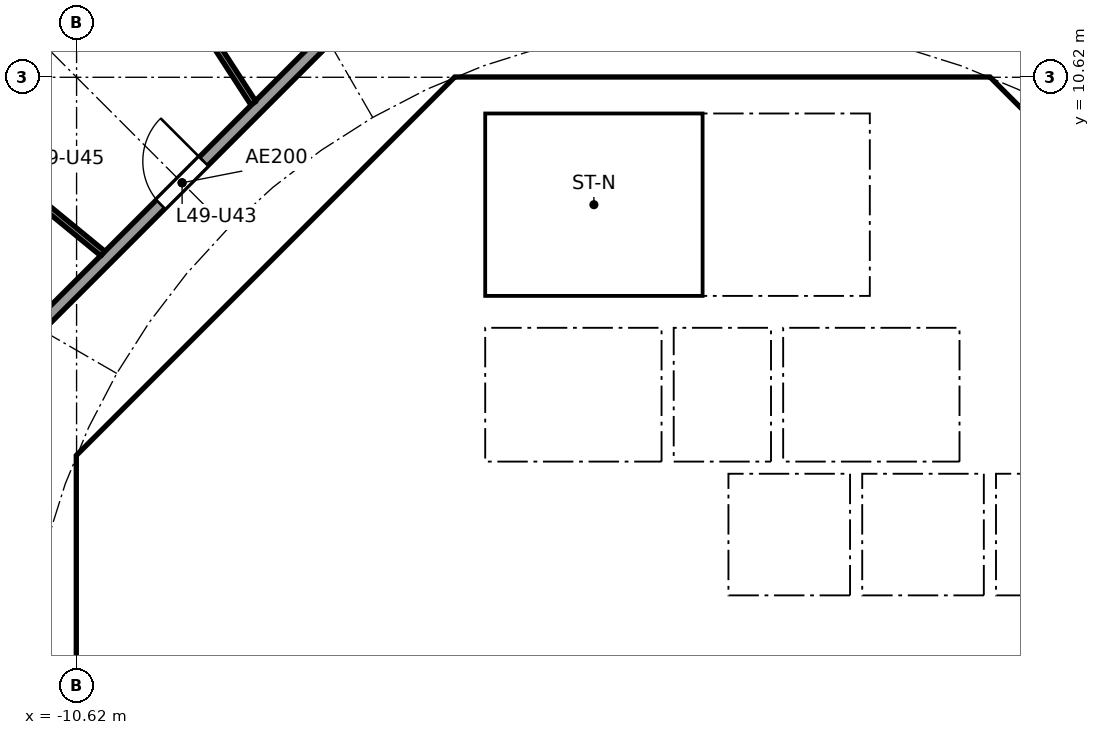
"""IFC4 building model, lengths in metres.
Left out: names, types, materials, properties, quantities, classifications, styles, units other than length and angle.
Written with IfcOpenShell. Run it as: python <this file> out.ifc"""

import sys

from ifc_helpers import new_model, si_unit, direction, frame, frame_2d, origin, place, context, subcontext, project, spatial, polyline, rectangle, outline, extrude, element, fill, save


model = new_model("IFC4")
c1 = context("Model", 3, precision=1e-05, world=origin(), true_north=direction((0.0, 1.0)))
c2 = subcontext(c1, "Body", "Model", "MODEL_VIEW")
j1 = project(units=[si_unit("LENGTHUNIT", "METRE"), si_unit("PLANEANGLEUNIT", "RADIAN")], contexts=[c1])
p1 = place(None, origin())
s1 = spatial("IfcSite", under=j1, at=p1, CompositionType="ELEMENT")
p2 = place(p1, origin())
s2 = spatial("IfcBuilding", under=s1, at=p2, CompositionType="ELEMENT")
p3 = place(p2, frame((0.0, 0.0, 195.5)))
s3 = spatial("IfcBuildingStorey", under=s2, at=p3, CompositionType="ELEMENT", Elevation=195.5)
p4 = place(p3, frame((9.988, 4.613, 0.0), z_axis=(0.0, 0.0, 1.0), x_axis=(-0.707106781187, 0.707106781187, 0.0)))
e1 = element("IfcWall", 1, at=p4, inside=s3, PredefinedType="SHEAR", context=c2, shape_type="SweptSolid", body=[
    extrude(rectangle(XDim=7.602, YDim=0.6, at=frame_2d((3.801, 0.0))), origin(), (0.0, 0.0, 1.0), 3.44),
])
p5 = place(p4, frame((3.201, 0.0, 0.0)))
e2 = element("IfcOpeningElement", 2, at=p5, cuts=e1, PredefinedType="OPENING", context=c2, shape_type="SweptSolid", body=[
    extrude(rectangle(XDim=1.2, YDim=2.1, at=frame_2d((0.6, 1.05))), frame((0.0, 0.31, 0.0), z_axis=(0.0, -1.0, 0.0), x_axis=(1.0, 0.0, 0.0)), (0.0, 0.0, 1.0), 0.62),
])
p6 = place(p3, frame((-4.613, 9.988, 0.0), z_axis=(0.0, 0.0, 1.0), x_axis=(-0.707106781187, -0.707106781187, 0.0)))
e3 = element("IfcWall", 3, at=p6, inside=s3, PredefinedType="SHEAR", context=c2, shape_type="SweptSolid", body=[
    extrude(rectangle(XDim=7.602, YDim=0.6, at=frame_2d((3.801, 0.0))), origin(), (0.0, 0.0, 1.0), 3.44),
])
p7 = place(p6, frame((0.351, 0.0, 0.0)))
e4 = element("IfcOpeningElement", 4, at=p7, cuts=e3, PredefinedType="OPENING", context=c2, shape_type="SweptSolid", body=[
    extrude(rectangle(XDim=1.1, YDim=2.1, at=frame_2d((0.55, 1.05))), frame((0.0, 0.31, 0.0), z_axis=(0.0, -1.0, 0.0), x_axis=(1.0, 0.0, 0.0)), (0.0, 0.0, 1.0), 0.62),
])
p8 = place(p3, frame((-10.325, 3.801, 0.0), z_axis=(0.0, 0.0, 1.0), x_axis=(0.0, -1.0, 0.0)))
e5 = element("IfcWall", 5, at=p8, inside=s3, PredefinedType="SHEAR", context=c2, shape_type="SweptSolid", body=[
    extrude(rectangle(XDim=7.602, YDim=0.6, at=frame_2d((3.801, 0.0))), origin(), (0.0, 0.0, 1.0), 3.44),
])
p9 = place(p8, frame((0.651, 0.0, 0.0)))
e6 = element("IfcOpeningElement", 6, at=p9, cuts=e5, PredefinedType="OPENING", context=c2, shape_type="SweptSolid", body=[
    extrude(rectangle(XDim=1.5, YDim=2.1, at=frame_2d((0.75, 1.05))), frame((0.0, 0.31, 0.0), z_axis=(0.0, -1.0, 0.0), x_axis=(1.0, 0.0, 0.0)), (0.0, 0.0, 1.0), 0.62),
])
p10 = place(p8, frame((5.451, 0.0, 0.0)))
e7 = element("IfcOpeningElement", 7, at=p10, cuts=e5, PredefinedType="OPENING", context=c2, shape_type="SweptSolid", body=[
    extrude(rectangle(XDim=1.5, YDim=2.1, at=frame_2d((0.75, 1.05))), frame((0.0, 0.31, 0.0), z_axis=(0.0, -1.0, 0.0), x_axis=(1.0, 0.0, 0.0)), (0.0, 0.0, 1.0), 0.62),
])
p11 = place(p3, frame((-5.8, 4.3, 0.0), z_axis=(0.0, 0.0, 1.0), x_axis=(0.0, 1.0, 0.0)))
e8 = element("IfcWall", 8, at=p11, inside=s3, PredefinedType="PARTITIONING", context=c2, shape_type="SweptSolid", body=[
    extrude(rectangle(XDim=3.927, YDim=0.15, at=frame_2d((1.963, 0.0))), origin(), (0.0, 0.0, 1.0), 3.44),
])
p12 = place(p11, frame((1.551, 0.0, 0.0)))
e9 = element("IfcOpeningElement", 9, at=p12, cuts=e8, PredefinedType="OPENING", context=c2, shape_type="SweptSolid", body=[
    extrude(rectangle(XDim=0.9, YDim=2.1, at=frame_2d((0.45, 1.05))), frame((0.0, 0.085, 0.0), z_axis=(0.0, -1.0, 0.0), x_axis=(1.0, 0.0, 0.0)), (0.0, 0.0, 1.0), 0.17),
])
p13 = place(p3, frame((4.0, 4.3, 0.0), z_axis=(0.0, 0.0, 1.0), x_axis=(0.0, 1.0, 0.0)))
e10 = element("IfcWall", 10, at=p13, inside=s3, PredefinedType="SOLIDWALL", context=c2, shape_type="SweptSolid", body=[
    extrude(rectangle(XDim=2.2, YDim=0.2, at=frame_2d((1.1, 0.0))), origin(), (0.0, 0.0, 1.0), 3.44),
])
p14 = place(p13, frame((0.55, 0.0, 0.0)))
e11 = element("IfcOpeningElement", 11, at=p14, cuts=e10, PredefinedType="OPENING", context=c2, shape_type="SweptSolid", body=[
    extrude(rectangle(XDim=1.1, YDim=2.1, at=frame_2d((0.55, 1.05))), frame((0.0, 0.11, 0.0), z_axis=(0.0, -1.0, 0.0), x_axis=(1.0, 0.0, 0.0)), (0.0, 0.0, 1.0), 0.22),
])
p15 = place(p3, frame((-4.0, 4.3, 0.0), z_axis=(0.0, 0.0, 1.0), x_axis=(0.0, 1.0, 0.0)))
e12 = element("IfcWall", 12, at=p15, inside=s3, PredefinedType="SOLIDWALL", context=c2, shape_type="SweptSolid", body=[
    extrude(rectangle(XDim=2.2, YDim=0.2, at=frame_2d((1.1, 0.0))), origin(), (0.0, 0.0, 1.0), 3.44),
])
p16 = place(p15, frame((0.55, 0.0, 0.0)))
e13 = element("IfcOpeningElement", 13, at=p16, cuts=e12, PredefinedType="OPENING", context=c2, shape_type="SweptSolid", body=[
    extrude(rectangle(XDim=1.1, YDim=2.1, at=frame_2d((0.55, 1.05))), frame((0.0, 0.11, 0.0), z_axis=(0.0, -1.0, 0.0), x_axis=(1.0, 0.0, 0.0)), (0.0, 0.0, 1.0), 0.22),
])
p17 = place(p3, frame((-6.7, 2.0, 0.0), z_axis=(0.0, 0.0, 1.0), x_axis=(1.0, 0.0, 0.0)))
e14 = element("IfcWall", 14, at=p17, inside=s3, PredefinedType="SOLIDWALL", context=c2, shape_type="SweptSolid", body=[
    extrude(rectangle(XDim=13.4, YDim=0.2, at=frame_2d((6.7, 0.0))), origin(), (0.0, 0.0, 1.0), 3.44),
])
p18 = place(p17, frame((7.25, 0.0, 0.0)))
e15 = element("IfcOpeningElement", 15, at=p18, cuts=e14, PredefinedType="OPENING", context=c2, shape_type="SweptSolid", body=[
    extrude(rectangle(XDim=1.1, YDim=2.1, at=frame_2d((0.55, 1.05))), frame((0.0, 0.11, 0.0), z_axis=(0.0, -1.0, 0.0), x_axis=(1.0, 0.0, 0.0)), (0.0, 0.0, 1.0), 0.22),
])
p19 = place(p17, frame((9.45, 0.0, 0.0)))
e16 = element("IfcOpeningElement", 16, at=p19, cuts=e14, PredefinedType="OPENING", context=c2, shape_type="SweptSolid", body=[
    extrude(rectangle(XDim=1.1, YDim=2.1, at=frame_2d((0.55, 1.05))), frame((0.0, 0.11, 0.0), z_axis=(0.0, -1.0, 0.0), x_axis=(1.0, 0.0, 0.0)), (0.0, 0.0, 1.0), 0.22),
])
p20 = place(p17, frame((2.95, 0.0, 0.0)))
e17 = element("IfcOpeningElement", 17, at=p20, cuts=e14, PredefinedType="OPENING", context=c2, shape_type="SweptSolid", body=[
    extrude(rectangle(XDim=0.9, YDim=2.1, at=frame_2d((0.45, 1.05))), frame((0.0, 0.11, 0.0), z_axis=(0.0, -1.0, 0.0), x_axis=(1.0, 0.0, 0.0)), (0.0, 0.0, 1.0), 0.22),
])
p21 = place(p3, frame((4.0, 7.025, 0.0), z_axis=(0.0, 0.0, 1.0), x_axis=(0.0, 1.0, 0.0)))
e18 = element("IfcWall", 18, at=p21, inside=s3, PredefinedType="SOLIDWALL", context=c2, shape_type="SweptSolid", body=[
    extrude(rectangle(XDim=3.0, YDim=0.2, at=frame_2d((1.5, 0.0))), origin(), (0.0, 0.0, 1.0), 3.44),
])
p22 = place(p21, frame((0.925, 0.0, 0.0)))
e19 = element("IfcOpeningElement", 19, at=p22, cuts=e18, PredefinedType="OPENING", context=c2, shape_type="SweptSolid", body=[
    extrude(rectangle(XDim=1.1, YDim=2.1, at=frame_2d((0.55, 1.05))), frame((0.0, 0.11, 0.0), z_axis=(0.0, -1.0, 0.0), x_axis=(1.0, 0.0, 0.0)), (0.0, 0.0, 1.0), 0.22),
])
p23 = place(p3, origin())
e20 = element("IfcWall", 20, at=p23, inside=s3, PredefinedType="SHEAR", context=c2, shape_type="SweptSolid", body=[
    extrude(outline(polyline([(-10.2, 4.825), (-9.776, 4.401), (-10.025, 4.152), (-10.025, 3.801), (-10.625, 3.801), (-10.625, 4.401), (-10.2, 4.825)])), origin(), (0.0, 0.0, 1.0), 3.44),
])
p24 = place(p3, origin())
e21 = element("IfcWall", 21, at=p24, inside=s3, PredefinedType="SHEAR", context=c2, shape_type="SweptSolid", body=[
    extrude(outline(polyline([(-4.152, 10.025), (-4.401, 9.776), (-4.825, 10.2), (-4.401, 10.625), (4.401, 10.625), (4.825, 10.2), (4.401, 9.776), (4.152, 10.025), (-4.152, 10.025)])), origin(), (0.0, 0.0, 1.0), 3.44),
])
for number, where, z_axis, x_axis in (
    (22, (-0.9, 4.3, 0.0), (0.0, 0.0, 1.0), (0.0, 1.0, 0.0)),
    (23, (0.9, 4.3, 0.0), (0.0, 0.0, 1.0), (0.0, 1.0, 0.0)),
):
    element("IfcWall", number, at=place(p3, frame(where, z_axis=z_axis, x_axis=x_axis)), inside=s3, PredefinedType="SOLIDWALL", context=c2, shape_type="SweptSolid", body=[
        extrude(rectangle(XDim=2.2, YDim=0.2, at=frame_2d((1.1, 0.0))), origin(), (0.0, 0.0, 1.0), 3.44),
    ])
p25 = place(p3, origin())
e24 = element("IfcWall", 24, at=p25, inside=s3, PredefinedType="SOLIDWALL", context=c2, shape_type="SweptSolid", body=[
    extrude(outline(polyline([(-6.7, 4.3), (6.7, 4.3), (6.7, 2.1), (6.5, 2.1), (6.5, 4.1), (4.5, 4.1), (4.5, 2.1), (4.3, 2.1), (4.3, 4.1), (2.3, 4.1), (2.3, 2.1), (2.1, 2.1), (2.1, 4.1), (0.1, 4.1), (0.1, 2.1), (-0.1, 2.1), (-0.1, 4.1), (-6.5, 4.1), (-6.5, 2.1), (-6.7, 2.1), (-6.7, 4.3)])), origin(), (0.0, 0.0, 1.0), 3.44),
])
p26 = place(p3, frame((-10.025, 4.0, 0.0), z_axis=(0.0, 0.0, 1.0), x_axis=(1.0, 0.0, 0.0)))
e25 = element("IfcWall", 25, at=p26, inside=s3, PredefinedType="PARTITIONING", context=c2, shape_type="SweptSolid", body=[
    extrude(rectangle(XDim=3.325, YDim=0.2, at=frame_2d((1.662, 0.0))), origin(), (0.0, 0.0, 1.0), 3.44),
])
p27 = place(p3, origin())
e26 = element("IfcWall", 26, at=p27, inside=s3, PredefinedType="SOLIDWALL", context=c2, shape_type="SweptSolid", body=[
    extrude(outline(polyline([(-3.9, 7.025), (-4.1, 7.025), (-4.1, 10.025), (-3.9, 10.025), (-3.9, 7.025)])), origin(), (0.0, 0.0, 1.0), 3.44),
])
p28 = place(p3, origin())
e27 = element("IfcWall", 27, at=p28, inside=s3, PredefinedType="SOLIDWALL", context=c2, shape_type="SweptSolid", body=[
    extrude(outline(polyline([(4.1, 6.5), (-4.1, 6.5), (-4.1, 7.025), (4.1, 7.025), (4.1, 6.5)])), origin(), (0.0, 0.0, 1.0), 3.44),
])
p29 = place(p3, frame((-5.275, 12.494, 0.0), z_axis=(0.0, 0.0, 1.0), x_axis=(-0.707106781187, -0.707106781187, 0.0)))
e28 = element("IfcWall", 28, at=p29, inside=s3, PredefinedType="PARTITIONING", context=c2, shape_type="SweptSolid", body=[
    extrude(rectangle(XDim=10.209, YDim=0.2, at=frame_2d((5.104, 0.0))), origin(), (0.0, 0.0, 1.0), 3.44),
])
p30 = place(p29, frame((4.604, 0.0, 0.0)))
e29 = element("IfcOpeningElement", 29, at=p30, cuts=e28, PredefinedType="OPENING", context=c2, shape_type="SweptSolid", body=[
    extrude(rectangle(XDim=1.0, YDim=2.1, at=frame_2d((0.5, 1.05))), frame((0.0, 0.11, 0.0), z_axis=(0.0, -1.0, 0.0), x_axis=(1.0, 0.0, 0.0)), (0.0, 0.0, 1.0), 0.22),
])
p31 = place(p3, frame((-7.712, 10.195, 0.0), z_axis=(0.0, 0.0, 1.0), x_axis=(-0.544179442551, 0.838968851809, 0.0)))
e30 = element("IfcWall", 30, at=p31, inside=s3, PredefinedType="PARTITIONING", context=c2, shape_type="SweptSolid", body=[
    extrude(rectangle(XDim=7.566, YDim=0.1, at=frame_2d((3.783, 0.0))), origin(), (0.0, 0.0, 1.0), 2.756),
])
p32 = place(p31, frame((1.343, 0.0, 0.0)))
e31 = element("IfcOpeningElement", 31, at=p32, cuts=e30, PredefinedType="OPENING", context=c2, shape_type="SweptSolid", body=[
    extrude(rectangle(XDim=0.9, YDim=2.1, at=frame_2d((0.45, 1.05))), frame((0.0, 0.06, 0.0), z_axis=(0.0, -1.0, 0.0), x_axis=(1.0, 0.0, 0.0)), (0.0, 0.0, 1.0), 0.12),
])
p33 = place(p31, frame((5.101, 0.0, 0.0)))
e32 = element("IfcOpeningElement", 32, at=p33, cuts=e30, PredefinedType="OPENING", context=c2, shape_type="SweptSolid", body=[
    extrude(rectangle(XDim=0.9, YDim=2.1, at=frame_2d((0.45, 1.05))), frame((0.0, 0.06, 0.0), z_axis=(0.0, -1.0, 0.0), x_axis=(1.0, 0.0, 0.0)), (0.0, 0.0, 1.0), 0.12),
])
p34 = place(p3, frame((-10.189, 7.721, 0.0), z_axis=(0.0, 0.0, 1.0), x_axis=(-0.773121441079, 0.634258021112, 0.0)))
e33 = element("IfcWall", 33, at=p34, inside=s3, PredefinedType="PARTITIONING", context=c2, shape_type="SweptSolid", body=[
    extrude(rectangle(XDim=6.577, YDim=0.1, at=frame_2d((3.289, 0.0))), origin(), (0.0, 0.0, 1.0), 2.756),
])
p35 = place(p34, frame((1.104, 0.0, 0.0)))
e34 = element("IfcOpeningElement", 34, at=p35, cuts=e33, PredefinedType="OPENING", context=c2, shape_type="SweptSolid", body=[
    extrude(rectangle(XDim=0.9, YDim=2.1, at=frame_2d((0.45, 1.05))), frame((0.0, 0.06, 0.0), z_axis=(0.0, -1.0, 0.0), x_axis=(1.0, 0.0, 0.0)), (0.0, 0.0, 1.0), 0.12),
])
p36 = place(p34, frame((4.367, 0.0, 0.0)))
e35 = element("IfcOpeningElement", 35, at=p36, cuts=e33, PredefinedType="OPENING", context=c2, shape_type="SweptSolid", body=[
    extrude(rectangle(XDim=0.9, YDim=2.1, at=frame_2d((0.45, 1.05))), frame((0.0, 0.06, 0.0), z_axis=(0.0, -1.0, 0.0), x_axis=(1.0, 0.0, 0.0)), (0.0, 0.0, 1.0), 0.12),
])
p37 = place(p18, origin())
e36 = element("IfcDoor", 36, at=p37, inside=s3, OperationType="DOUBLE_DOOR_SLIDING", PredefinedType="DOOR", context=c2, shape_type="SweptSolid", body=[
    extrude(rectangle(XDim=1.1, YDim=2.1, at=frame_2d((0.55, 1.05))), frame((0.0, 0.025, 0.0), z_axis=(0.0, -1.0, 0.0), x_axis=(1.0, 0.0, 0.0)), (0.0, 0.0, 1.0), 0.05),
])
fill(e15, e36)
p38 = place(p19, origin())
e37 = element("IfcDoor", 37, at=p38, inside=s3, OperationType="DOUBLE_DOOR_SLIDING", PredefinedType="DOOR", context=c2, shape_type="SweptSolid", body=[
    extrude(rectangle(XDim=1.1, YDim=2.1, at=frame_2d((0.55, 1.05))), frame((0.0, 0.025, 0.0), z_axis=(0.0, -1.0, 0.0), x_axis=(1.0, 0.0, 0.0)), (0.0, 0.0, 1.0), 0.05),
])
fill(e16, e37)
p39 = place(p14, origin())
e38 = element("IfcDoor", 38, at=p39, inside=s3, OperationType="DOUBLE_DOOR_SLIDING", PredefinedType="DOOR", context=c2, shape_type="SweptSolid", body=[
    extrude(rectangle(XDim=1.1, YDim=2.1, at=frame_2d((0.55, 1.05))), frame((0.0, 0.025, 0.0), z_axis=(0.0, -1.0, 0.0), x_axis=(1.0, 0.0, 0.0)), (0.0, 0.0, 1.0), 0.05),
])
fill(e11, e38)
p40 = place(p16, origin())
e39 = element("IfcDoor", 39, at=p40, inside=s3, OperationType="DOUBLE_DOOR_SLIDING", PredefinedType="DOOR", context=c2, shape_type="SweptSolid", body=[
    extrude(rectangle(XDim=1.1, YDim=2.1, at=frame_2d((0.55, 1.05))), frame((0.0, 0.025, 0.0), z_axis=(0.0, -1.0, 0.0), x_axis=(1.0, 0.0, 0.0)), (0.0, 0.0, 1.0), 0.05),
])
fill(e13, e39)
p41 = place(p22, origin())
e40 = element("IfcDoor", 40, at=p41, inside=s3, OperationType="SINGLE_SWING_RIGHT", PredefinedType="DOOR", context=c2, shape_type="SweptSolid", body=[
    extrude(rectangle(XDim=1.1, YDim=2.1, at=frame_2d((0.55, 1.05))), frame((0.0, 0.025, 0.0), z_axis=(0.0, -1.0, 0.0), x_axis=(1.0, 0.0, 0.0)), (0.0, 0.0, 1.0), 0.05),
])
fill(e19, e40)
p42 = place(p12, origin())
e41 = element("IfcDoor", 41, at=p42, inside=s3, OperationType="SINGLE_SWING_LEFT", PredefinedType="DOOR", context=c2, shape_type="SweptSolid", body=[
    extrude(rectangle(XDim=0.9, YDim=2.1, at=frame_2d((0.45, 1.05))), frame((0.0, 0.025, 0.0), z_axis=(0.0, -1.0, 0.0), x_axis=(1.0, 0.0, 0.0)), (0.0, 0.0, 1.0), 0.05),
])
fill(e9, e41)
p43 = place(p20, origin())
e42 = element("IfcDoor", 42, at=p43, inside=s3, OperationType="SINGLE_SWING_RIGHT", PredefinedType="DOOR", context=c2, shape_type="SweptSolid", body=[
    extrude(rectangle(XDim=0.9, YDim=2.1, at=frame_2d((0.45, 1.05))), frame((0.0, 0.025, 0.0), z_axis=(0.0, -1.0, 0.0), x_axis=(1.0, 0.0, 0.0)), (0.0, 0.0, 1.0), 0.05),
])
fill(e17, e42)
p44 = place(p9, origin())
e43 = element("IfcDoor", 43, at=p44, inside=s3, OperationType="DOUBLE_DOOR_SINGLE_SWING", PredefinedType="DOOR", context=c2, shape_type="SweptSolid", body=[
    extrude(rectangle(XDim=1.5, YDim=2.1, at=frame_2d((0.75, 1.05))), frame((0.0, 0.025, 0.0), z_axis=(0.0, -1.0, 0.0), x_axis=(1.0, 0.0, 0.0)), (0.0, 0.0, 1.0), 0.05),
])
fill(e6, e43)
p45 = place(p7, origin())
e44 = element("IfcDoor", 44, at=p45, inside=s3, OperationType="SINGLE_SWING_RIGHT", PredefinedType="DOOR", context=c2, shape_type="SweptSolid", body=[
    extrude(rectangle(XDim=1.1, YDim=2.1, at=frame_2d((0.55, 1.05))), frame((0.0, 0.025, 0.0), z_axis=(0.0, -1.0, 0.0), x_axis=(1.0, 0.0, 0.0)), (0.0, 0.0, 1.0), 0.05),
])
fill(e4, e44)
p46 = place(p30, frame((1.0, 0.0, 0.0), x_axis=(-1.0, 0.0, 0.0)))
e45 = element("IfcDoor", 45, at=p46, inside=s3, OperationType="SINGLE_SWING_RIGHT", PredefinedType="DOOR", context=c2, shape_type="SweptSolid", body=[
    extrude(rectangle(XDim=1.0, YDim=2.1, at=frame_2d((0.5, 1.05))), frame((0.0, 0.025, 0.0), z_axis=(0.0, -1.0, 0.0), x_axis=(1.0, 0.0, 0.0)), (0.0, 0.0, 1.0), 0.05),
])
fill(e29, e45)
save(model, sys.argv[1])
